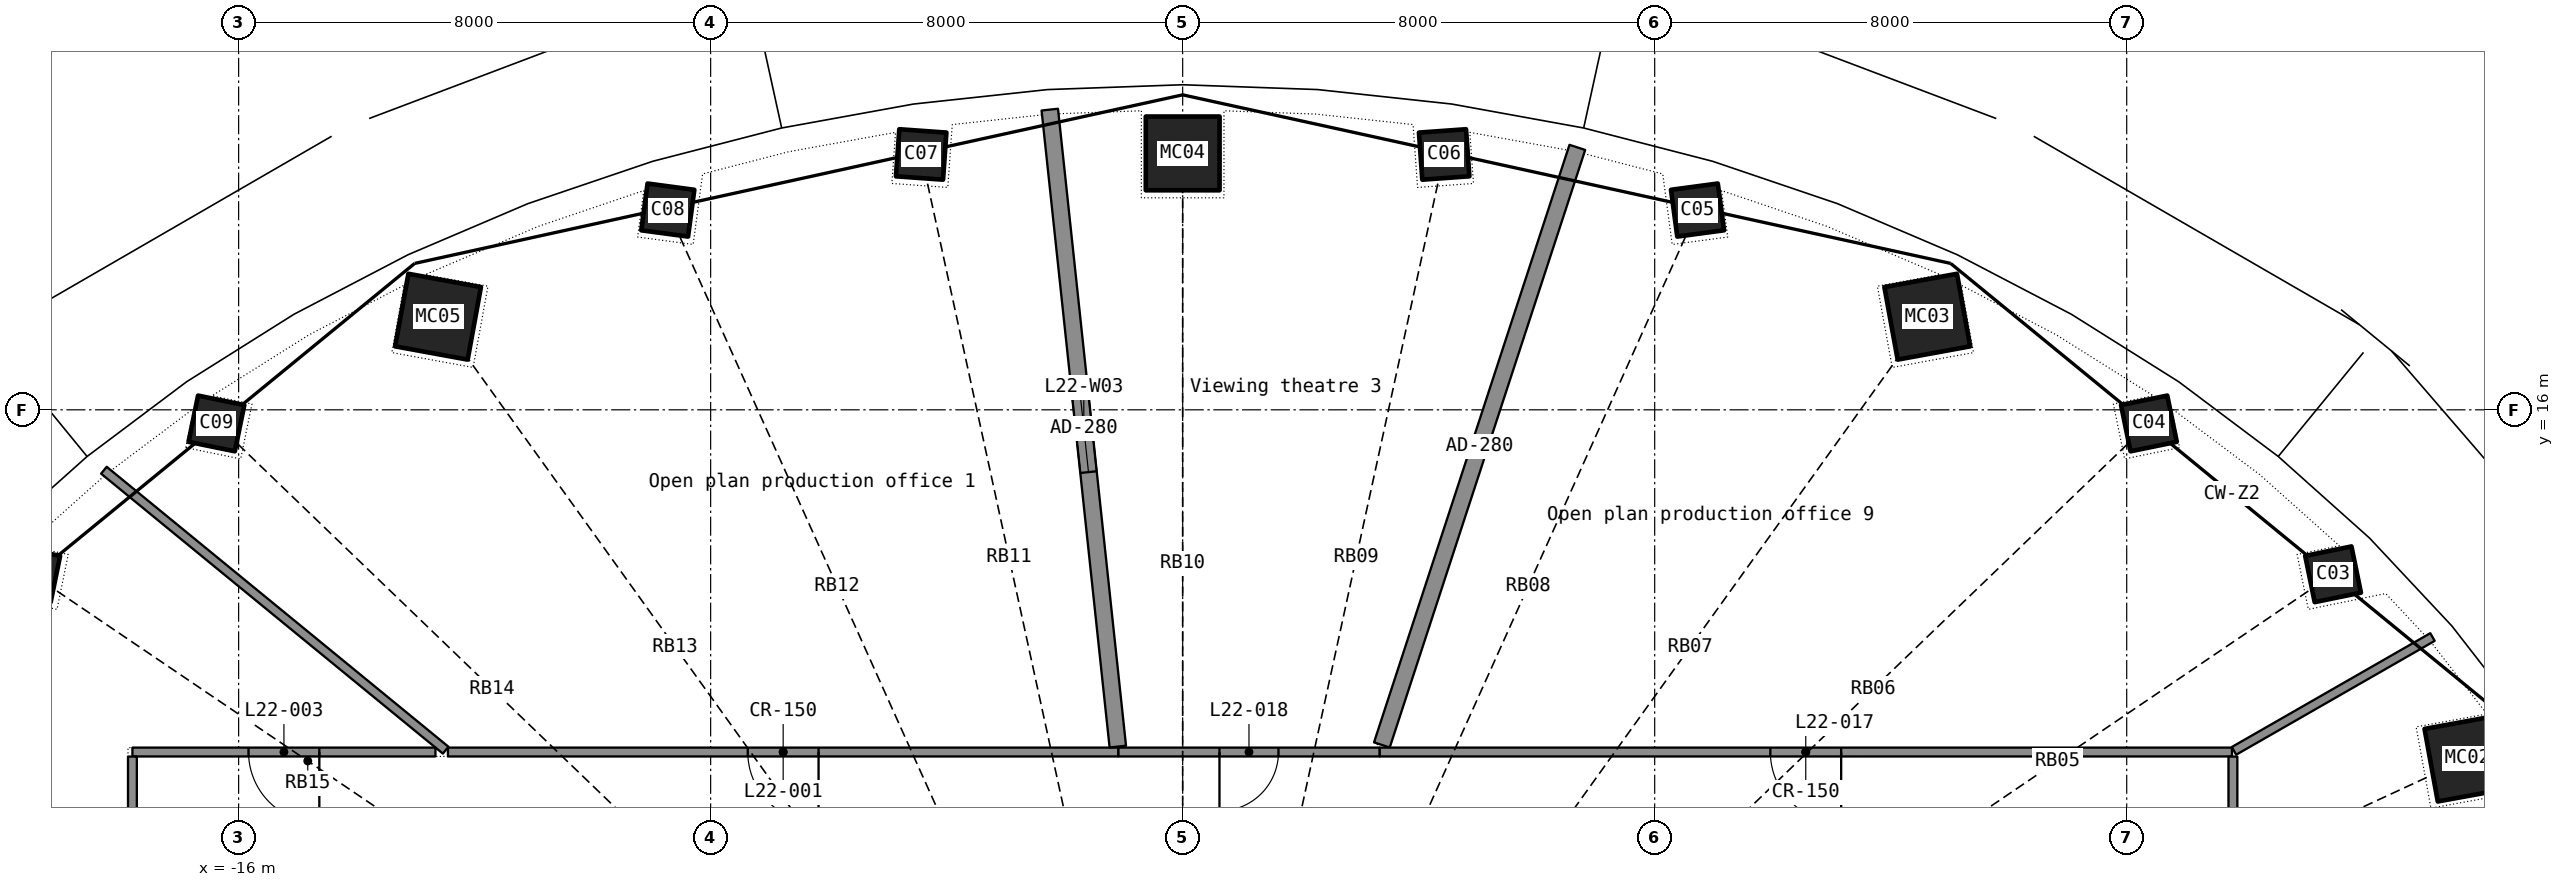
"""IFC4 building model, lengths in metres.
Left out: names, types, materials, properties, quantities, classifications, styles, units other than length and angle.
Written with IfcOpenShell. Run it as: python <this file> out.ifc"""

import sys

from ifc_helpers import new_model, si_unit, direction, frame, frame_2d, origin, origin_2d, place, context, subcontext, project, spatial, rectangle, hollow_rectangle, extrude, element, fill, save


model = new_model("IFC4")
c1 = context("Model", 3, precision=1e-05, world=origin(), true_north=direction((0.0, 1.0)))
c2 = subcontext(c1, "Body", "Model", "MODEL_VIEW")
j1 = project(units=[si_unit("LENGTHUNIT", "METRE"), si_unit("PLANEANGLEUNIT", "RADIAN")], contexts=[c1])
p1 = place(None, origin())
s1 = spatial("IfcSite", under=j1, at=p1, CompositionType="ELEMENT")
p2 = place(p1, origin())
s2 = spatial("IfcBuilding", under=s1, at=p2, CompositionType="ELEMENT")
p3 = place(p2, frame((0.0, 0.0, 97.1)))
s3 = spatial("IfcBuildingStorey", under=s2, at=p3, CompositionType="ELEMENT", Elevation=97.1)
p4 = place(p3, frame((21.775, 10.089, 0.0), z_axis=(-0.030006556, -0.014178922, 0.999449131), x_axis=(0.582175965, -0.813041088, 0.005944324)))
e1 = element("IfcColumn", 1, at=p4, inside=s3, PredefinedType="COLUMN", context=c2, shape_type="SweptSolid", body=[
    extrude(hollow_rectangle(XDim=1.25, YDim=1.25, WallThickness=0.032, at=origin_2d()), origin(), (0.0, 0.0, 1.0), 3.702),
])
p5 = place(p3, frame((19.497, 13.212, 0.0), z_axis=(-0.026446274, -0.018202423, 0.9994845), x_axis=(0.720536539, -0.693387088, 0.0064375)))
e2 = element("IfcColumn", 2, at=p5, inside=s3, PredefinedType="COLUMN", context=c2, shape_type="SweptSolid", body=[
    extrude(hollow_rectangle(XDim=0.8, YDim=0.8, WallThickness=0.025, at=origin_2d()), origin(), (0.0, 0.0, 1.0), 3.702),
])
p6 = place(p3, frame((16.376, 15.769, 0.0), z_axis=(-0.022226156, -0.021698532, 0.999517469), x_axis=(0.827910736, -0.560825227, 0.006235198)))
e3 = element("IfcColumn", 3, at=p6, inside=s3, PredefinedType="COLUMN", context=c2, shape_type="SweptSolid", body=[
    extrude(hollow_rectangle(XDim=0.8, YDim=0.8, WallThickness=0.025, at=origin_2d()), origin(), (0.0, 0.0, 1.0), 3.702),
])
p7 = place(p3, frame((12.621, 17.578, 0.0), z_axis=(-0.017346173, -0.024535271, 0.999548463), x_axis=(0.907049274, -0.420989759, 0.005407177)))
e4 = element("IfcColumn", 4, at=p7, inside=s3, PredefinedType="COLUMN", context=c2, shape_type="SweptSolid", body=[
    extrude(hollow_rectangle(XDim=1.25, YDim=1.25, WallThickness=0.032, at=origin_2d()), origin(), (0.0, 0.0, 1.0), 3.702),
])
for number, where, z_axis, x_axis in (
    (5, (8.726, 19.386, 0.0), (-0.012, -0.027, 1.0), (0.96, -0.28, 0.004)),
    (6, (4.432, 20.328, 0.0), (-0.006, -0.028, 1.0), (0.99, -0.138, 0.002)),
):
    element("IfcColumn", number, at=place(p3, frame(where, z_axis=z_axis, x_axis=x_axis)), inside=s3, PredefinedType="COLUMN", context=c2, shape_type="SweptSolid", body=[
        extrude(hollow_rectangle(XDim=0.8, YDim=0.8, WallThickness=0.025, at=origin_2d()), origin(), (0.0, 0.0, 1.0), 3.701),
    ])
p8 = place(p3, frame((0.0, 20.346, 0.0), z_axis=(0.0, -0.02836206, 0.999597716), x_axis=(1.0, 0.0, 0.0)))
e7 = element("IfcColumn", 7, at=p8, inside=s3, PredefinedType="COLUMN", context=c2, shape_type="SweptSolid", body=[
    extrude(hollow_rectangle(XDim=1.25, YDim=1.25, WallThickness=0.032, at=origin_2d()), origin(), (0.0, 0.0, 1.0), 3.701),
])
for number, where, z_axis, x_axis in (
    (8, (-4.432, 20.328, 0.0), (0.006, -0.028, 1.0), (0.99, 0.138, -0.002)),
    (9, (-8.726, 19.386, 0.0), (0.012, -0.027, 1.0), (0.96, 0.28, -0.004)),
):
    element("IfcColumn", number, at=place(p3, frame(where, z_axis=z_axis, x_axis=x_axis)), inside=s3, PredefinedType="COLUMN", context=c2, shape_type="SweptSolid", body=[
        extrude(hollow_rectangle(XDim=0.8, YDim=0.8, WallThickness=0.025, at=origin_2d()), origin(), (0.0, 0.0, 1.0), 3.701),
    ])
p9 = place(p3, frame((-12.621, 17.578, 0.0), z_axis=(0.017346173, -0.024535271, 0.999548463), x_axis=(0.907049274, 0.420989759, -0.005407177)))
e10 = element("IfcColumn", 10, at=p9, inside=s3, PredefinedType="COLUMN", context=c2, shape_type="SweptSolid", body=[
    extrude(hollow_rectangle(XDim=1.25, YDim=1.25, WallThickness=0.032, at=origin_2d()), origin(), (0.0, 0.0, 1.0), 3.702),
])
p10 = place(p3, frame((-16.376, 15.769, 0.0), z_axis=(0.022226156, -0.021698532, 0.999517469), x_axis=(0.827910736, 0.560825227, -0.006235198)))
e11 = element("IfcColumn", 11, at=p10, inside=s3, PredefinedType="COLUMN", context=c2, shape_type="SweptSolid", body=[
    extrude(hollow_rectangle(XDim=0.8, YDim=0.8, WallThickness=0.025, at=origin_2d()), origin(), (0.0, 0.0, 1.0), 3.702),
])
p11 = place(p3, frame((-19.497, 13.212, 0.0), z_axis=(0.026446274, -0.018202423, 0.9994845), x_axis=(0.720536539, 0.693387088, -0.0064375)))
e12 = element("IfcColumn", 12, at=p11, inside=s3, PredefinedType="COLUMN", context=c2, shape_type="SweptSolid", body=[
    extrude(hollow_rectangle(XDim=0.8, YDim=0.8, WallThickness=0.025, at=origin_2d()), origin(), (0.0, 0.0, 1.0), 3.702),
])
p12 = place(p3, frame((17.784, 10.2, 0.0), z_axis=(0.0, 0.0, 1.0), x_axis=(-1.0, 0.0, 0.0)))
e13 = element("IfcWall", 13, at=p12, inside=s3, PredefinedType="PARTITIONING", context=c2, shape_type="SweptSolid", body=[
    extrude(rectangle(XDim=14.447, YDim=0.15, at=frame_2d((7.224, 0.0))), origin(), (0.0, 0.0, 1.0), 2.4),
])
p13 = place(p12, frame((6.624, 0.0, 0.0)))
e14 = element("IfcOpeningElement", 14, at=p13, cuts=e13, PredefinedType="OPENING", context=c2, shape_type="SweptSolid", body=[
    extrude(rectangle(XDim=1.2, YDim=2.2, at=frame_2d((0.6, 1.1))), frame((0.0, 0.085, 0.0), z_axis=(0.0, -1.0, 0.0), x_axis=(1.0, 0.0, 0.0)), (0.0, 0.0, 1.0), 0.17),
])
p14 = place(p3, frame((-1.089, 10.2, 0.0), z_axis=(0.0, 0.0, 1.0), x_axis=(-1.0, 0.0, 0.0)))
e15 = element("IfcWall", 15, at=p14, inside=s3, PredefinedType="PARTITIONING", context=c2, shape_type="SweptSolid", body=[
    extrude(rectangle(XDim=11.363, YDim=0.15, at=frame_2d((5.682, 0.0))), origin(), (0.0, 0.0, 1.0), 2.4),
])
p15 = place(p14, frame((5.082, 0.0, 0.0)))
e16 = element("IfcOpeningElement", 16, at=p15, cuts=e15, PredefinedType="OPENING", context=c2, shape_type="SweptSolid", body=[
    extrude(rectangle(XDim=1.2, YDim=2.2, at=frame_2d((0.6, 1.1))), frame((0.0, 0.085, 0.0), z_axis=(0.0, -1.0, 0.0), x_axis=(1.0, 0.0, 0.0)), (0.0, 0.0, 1.0), 0.17),
])
p16 = place(p3, frame((-1.099, 10.292, 0.0), z_axis=(0.0, 0.0, 1.0), x_axis=(-0.106202827, 0.994344487, 0.0)))
e17 = element("IfcWall", 17, at=p16, inside=s3, PredefinedType="PARTITIONING", context=c2, shape_type="SweptSolid", body=[
    extrude(rectangle(XDim=10.857, YDim=0.28, at=frame_2d((5.429, 0.0))), origin(), (0.0, 0.0, 1.0), 2.4),
])
p17 = place(p16, frame((4.679, 0.0, 1.0)))
e18 = element("IfcOpeningElement", 18, at=p17, cuts=e17, PredefinedType="OPENING", context=c2, shape_type="SweptSolid", body=[
    extrude(rectangle(XDim=1.5, YDim=1.2, at=frame_2d((0.75, 0.6))), frame((0.0, 0.15, 0.0), z_axis=(0.0, -1.0, 0.0), x_axis=(1.0, 0.0, 0.0)), (0.0, 0.0, 1.0), 0.3),
])
p18 = place(p3, frame((6.689, 20.448, 0.0), z_axis=(0.0, 0.0, 1.0), x_axis=(-0.310888923, -0.950446252, 0.0)))
e19 = element("IfcWall", 19, at=p18, inside=s3, PredefinedType="PARTITIONING", context=c2, shape_type="SweptSolid", body=[
    extrude(rectangle(XDim=10.656, YDim=0.28, at=frame_2d((5.328, 0.0))), origin(), (0.0, 0.0, 1.0), 2.4),
])
p19 = place(p3, frame((-18.283, 14.976, 0.0), z_axis=(0.0, 0.0, 1.0), x_axis=(0.773592541, -0.633683344, 0.0)))
e20 = element("IfcWall", 20, at=p19, inside=s3, PredefinedType="PARTITIONING", context=c2, shape_type="SweptSolid", body=[
    extrude(rectangle(XDim=7.488, YDim=0.15, at=frame_2d((3.744, 0.0))), origin(), (0.0, 0.0, 1.0), 2.4),
])
p20 = place(p3, frame((-12.665, 10.2, 0.0), z_axis=(0.0, 0.0, 1.0), x_axis=(-1.0, 0.0, 0.0)))
e21 = element("IfcWall", 21, at=p20, inside=s3, PredefinedType="PARTITIONING", context=c2, shape_type="SweptSolid", body=[
    extrude(rectangle(XDim=5.135, YDim=0.15, at=frame_2d((2.568, 0.0))), origin(), (0.0, 0.0, 1.0), 2.4),
])
p21 = place(p20, frame((1.968, 0.0, 0.0)))
e22 = element("IfcOpeningElement", 22, at=p21, cuts=e21, PredefinedType="OPENING", context=c2, shape_type="SweptSolid", body=[
    extrude(rectangle(XDim=1.2, YDim=2.2, at=frame_2d((0.6, 1.1))), frame((0.0, 0.085, 0.0), z_axis=(0.0, -1.0, 0.0), x_axis=(1.0, 0.0, 0.0)), (0.0, 0.0, 1.0), 0.17),
])
p22 = place(p3, frame((3.336, 10.2, 0.0), z_axis=(0.0, 0.0, 1.0), x_axis=(-1.0, 0.0, 0.0)))
e23 = element("IfcWall", 23, at=p22, inside=s3, PredefinedType="PARTITIONING", context=c2, shape_type="SweptSolid", body=[
    extrude(rectangle(XDim=4.424, YDim=0.15, at=frame_2d((2.212, 0.0))), origin(), (0.0, 0.0, 1.0), 2.4),
])
p23 = place(p22, frame((1.712, 0.0, 0.0)))
e24 = element("IfcOpeningElement", 24, at=p23, cuts=e23, PredefinedType="OPENING", context=c2, shape_type="SweptSolid", body=[
    extrude(rectangle(XDim=1.0, YDim=2.2, at=frame_2d((0.5, 1.1))), frame((0.0, 0.085, 0.0), z_axis=(0.0, -1.0, 0.0), x_axis=(1.0, 0.0, 0.0)), (0.0, 0.0, 1.0), 0.17),
])
p24 = place(p3, frame((21.183, 12.149, 0.0), z_axis=(0.0, 0.0, 1.0), x_axis=(-0.867451833, -0.497521173, 0.0)))
e25 = element("IfcWall", 25, at=p24, inside=s3, PredefinedType="PARTITIONING", context=c2, shape_type="SweptSolid", body=[
    extrude(rectangle(XDim=3.879, YDim=0.15, at=frame_2d((1.939, 0.0))), origin(), (0.0, 0.0, 1.0), 2.4),
])
for number, where, z_axis, x_axis in (
    (26, (17.8, 7.213, 0.0), (0.0, 0.0, 1.0), (0.0, 1.0, 0.0)),
    (27, (-17.8, 10.123, 0.0), (0.0, 0.0, 1.0), (0.0, -1.0, 0.0)),
):
    element("IfcWall", number, at=place(p3, frame(where, z_axis=z_axis, x_axis=x_axis)), inside=s3, PredefinedType="PARTITIONING", context=c2, shape_type="SweptSolid", body=[
        extrude(rectangle(XDim=2.91, YDim=0.15, at=frame_2d((1.455, 0.0))), origin(), (0.0, 0.0, 1.0), 2.4),
    ])
p25 = place(p15, origin())
e28 = element("IfcDoor", 28, at=p25, inside=s3, OperationType="DOUBLE_DOOR_SINGLE_SWING", PredefinedType="DOOR", context=c2, shape_type="SweptSolid", body=[
    extrude(rectangle(XDim=1.2, YDim=2.2, at=frame_2d((0.6, 1.1))), frame((0.0, 0.025, 0.0), z_axis=(0.0, -1.0, 0.0), x_axis=(1.0, 0.0, 0.0)), (0.0, 0.0, 1.0), 0.05),
])
fill(e16, e28)
p26 = place(p21, origin())
e29 = element("IfcDoor", 29, at=p26, inside=s3, OperationType="DOUBLE_DOOR_SINGLE_SWING", PredefinedType="DOOR", context=c2, shape_type="SweptSolid", body=[
    extrude(rectangle(XDim=1.2, YDim=2.2, at=frame_2d((0.6, 1.1))), frame((0.0, 0.025, 0.0), z_axis=(0.0, -1.0, 0.0), x_axis=(1.0, 0.0, 0.0)), (0.0, 0.0, 1.0), 0.05),
])
fill(e22, e29)
p27 = place(p13, origin())
e30 = element("IfcDoor", 30, at=p27, inside=s3, OperationType="DOUBLE_DOOR_SINGLE_SWING", PredefinedType="DOOR", context=c2, shape_type="SweptSolid", body=[
    extrude(rectangle(XDim=1.2, YDim=2.2, at=frame_2d((0.6, 1.1))), frame((0.0, 0.025, 0.0), z_axis=(0.0, -1.0, 0.0), x_axis=(1.0, 0.0, 0.0)), (0.0, 0.0, 1.0), 0.05),
])
fill(e14, e30)
p28 = place(p23, origin())
e31 = element("IfcDoor", 31, at=p28, inside=s3, OperationType="SINGLE_SWING_RIGHT", PredefinedType="DOOR", context=c2, shape_type="SweptSolid", body=[
    extrude(rectangle(XDim=1.0, YDim=2.2, at=frame_2d((0.5, 1.1))), frame((0.0, 0.025, 0.0), z_axis=(0.0, -1.0, 0.0), x_axis=(1.0, 0.0, 0.0)), (0.0, 0.0, 1.0), 0.05),
])
fill(e24, e31)
p29 = place(p17, origin())
e32 = element("IfcWindow", 32, at=p29, inside=s3, PartitioningType="SINGLE_PANEL", PredefinedType="WINDOW", context=c2, shape_type="SweptSolid", body=[
    extrude(rectangle(XDim=1.5, YDim=1.2, at=frame_2d((0.75, 0.6))), frame((0.0, 0.03, 0.0), z_axis=(0.0, -1.0, 0.0), x_axis=(1.0, 0.0, 0.0)), (0.0, 0.0, 1.0), 0.06),
])
fill(e18, e32)
save(model, sys.argv[1])
